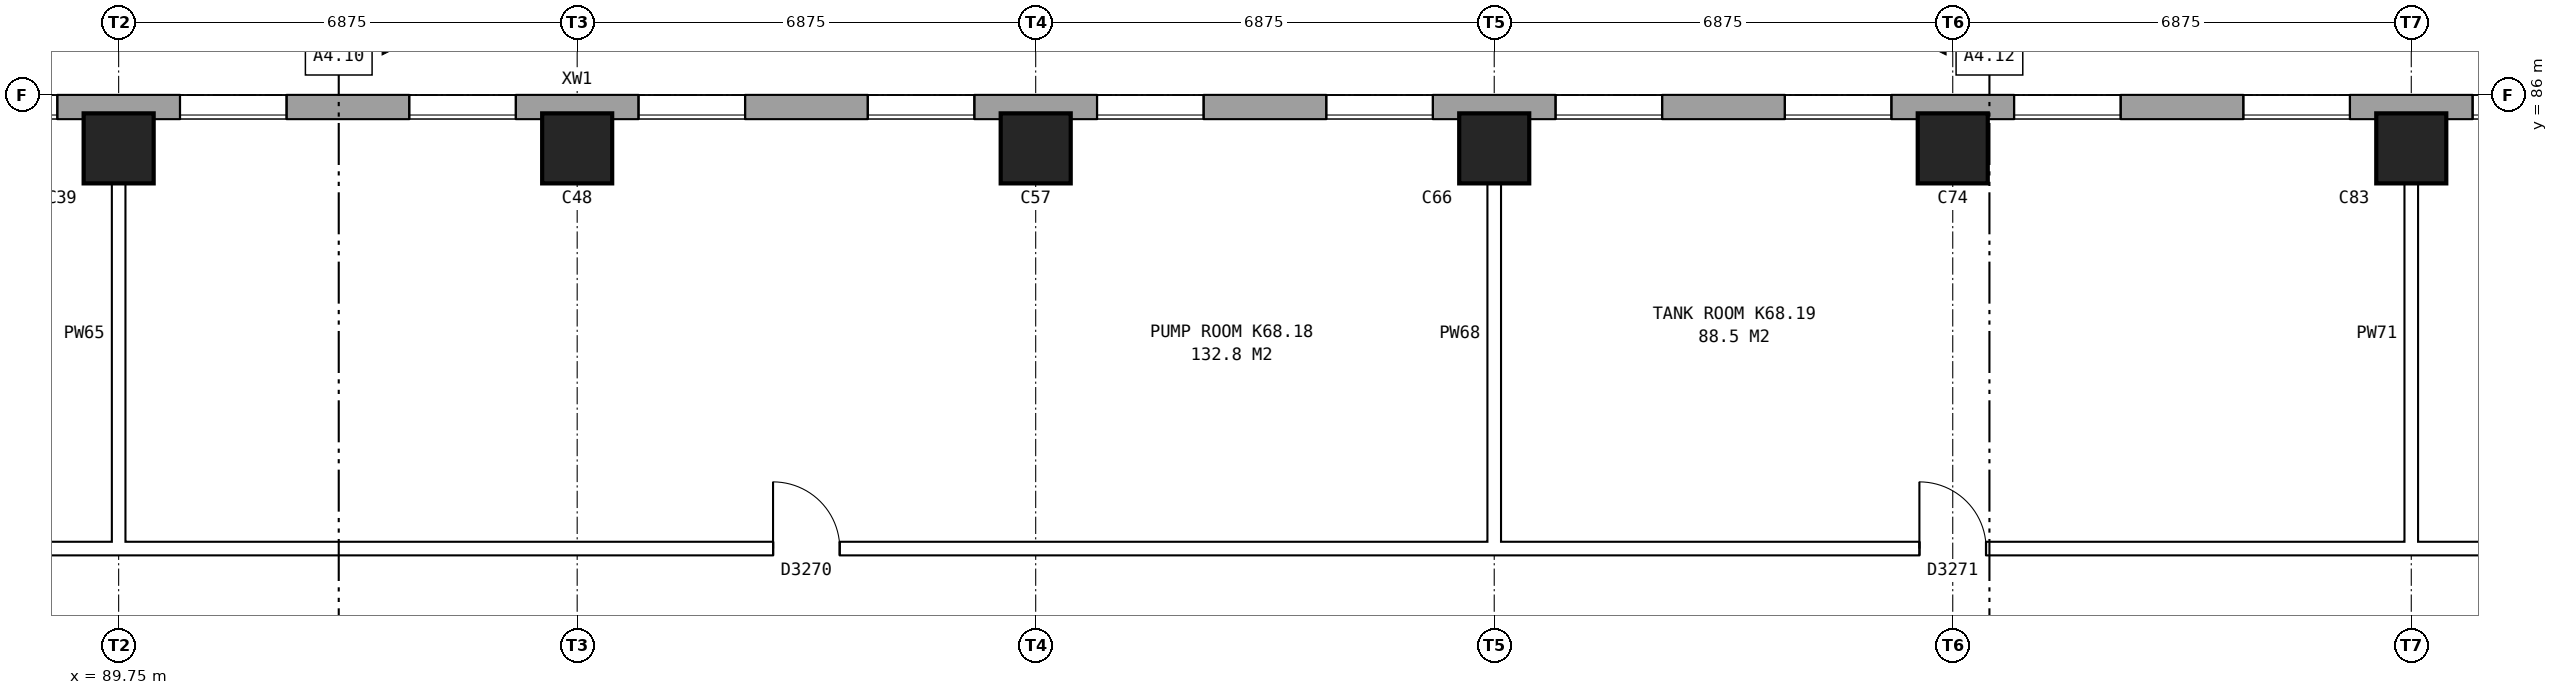
"""IFC4 building model, lengths in metres.
Left out: names, types, materials, properties, quantities, classifications, styles, units other than length and angle.
Written with IfcOpenShell. Run it as: python <this file> out.ifc"""

import sys

from ifc_helpers import new_model, si_unit, direction, frame, frame_2d, origin, origin_2d, place, context, subcontext, project, spatial, rectangle, hollow_rectangle, extrude, element, fill, save


model = new_model("IFC4")
c1 = context("Model", 3, precision=1e-05, world=origin(), true_north=direction((0.0, 1.0)))
c2 = subcontext(c1, "Body", "Model", "MODEL_VIEW")
j1 = project(units=[si_unit("LENGTHUNIT", "METRE"), si_unit("PLANEANGLEUNIT", "RADIAN")], contexts=[c1])
p1 = place(None, origin())
s1 = spatial("IfcSite", under=j1, at=p1, CompositionType="ELEMENT")
p2 = place(p1, origin())
s2 = spatial("IfcBuilding", under=s1, at=p2, CompositionType="ELEMENT")
p3 = place(p2, frame((0.0, 0.0, 243.9)))
s3 = spatial("IfcBuildingStorey", under=s2, at=p3, CompositionType="ELEMENT", Elevation=243.9)
for number, where, z_axis, x_axis in (
    (1, (89.75, 85.2, 0.0), (0.0, 0.0, 1.0), (1.0, 0.0, 0.0)),
    (2, (96.625, 85.2, 0.0), (0.0, 0.0, 1.0), (1.0, 0.0, 0.0)),
    (3, (103.5, 85.2, 0.0), (0.0, 0.0, 1.0), (1.0, 0.0, 0.0)),
    (4, (110.375, 85.2, 0.0), (0.0, 0.0, 1.0), (1.0, 0.0, 0.0)),
    (5, (117.25, 85.2, 0.0), (0.0, 0.0, 1.0), (1.0, 0.0, 0.0)),
    (6, (124.125, 85.2, 0.0), (0.0, 0.0, 1.0), (1.0, 0.0, 0.0)),
):
    element("IfcColumn", number, at=place(p3, frame(where, z_axis=z_axis, x_axis=x_axis)), inside=s3, PredefinedType="COLUMN", context=c2, shape_type="SweptSolid", body=[
        extrude(hollow_rectangle(XDim=1.05, YDim=1.05, WallThickness=0.044, at=origin_2d()), origin(), (0.0, 0.0, 1.0), 18.363),
    ])
p4 = place(p3, frame((131.025, 85.82, 0.0), z_axis=(0.0, 0.0, 1.0), x_axis=(-1.0, 0.0, 0.0)))
e7 = element("IfcWall", 7, at=p4, inside=s3, PredefinedType="STANDARD", context=c2, shape_type="SweptSolid", body=[
    extrude(rectangle(XDim=55.05, YDim=0.36, at=frame_2d((27.525, 0.0))), origin(), (0.0, 0.0, 1.0), 19.21),
])
p5 = place(p4, frame((52.506, 0.0, 1.5)))
e8 = element("IfcOpeningElement", 8, at=p5, cuts=e7, PredefinedType="OPENING", context=c2, shape_type="SweptSolid", body=[
    extrude(rectangle(XDim=1.6, YDim=1.2, at=frame_2d((0.8, 0.6))), frame((0.0, 0.19, 0.0), z_axis=(0.0, -1.0, 0.0), x_axis=(1.0, 0.0, 0.0)), (0.0, 0.0, 1.0), 0.38),
])
p6 = place(p4, frame((49.069, 0.0, 1.5)))
e9 = element("IfcOpeningElement", 9, at=p6, cuts=e7, PredefinedType="OPENING", context=c2, shape_type="SweptSolid", body=[
    extrude(rectangle(XDim=1.6, YDim=1.2, at=frame_2d((0.8, 0.6))), frame((0.0, 0.19, 0.0), z_axis=(0.0, -1.0, 0.0), x_axis=(1.0, 0.0, 0.0)), (0.0, 0.0, 1.0), 0.38),
])
p7 = place(p4, frame((45.631, 0.0, 1.5)))
e10 = element("IfcOpeningElement", 10, at=p7, cuts=e7, PredefinedType="OPENING", context=c2, shape_type="SweptSolid", body=[
    extrude(rectangle(XDim=1.6, YDim=1.2, at=frame_2d((0.8, 0.6))), frame((0.0, 0.19, 0.0), z_axis=(0.0, -1.0, 0.0), x_axis=(1.0, 0.0, 0.0)), (0.0, 0.0, 1.0), 0.38),
])
p8 = place(p4, frame((42.194, 0.0, 1.5)))
e11 = element("IfcOpeningElement", 11, at=p8, cuts=e7, PredefinedType="OPENING", context=c2, shape_type="SweptSolid", body=[
    extrude(rectangle(XDim=1.6, YDim=1.2, at=frame_2d((0.8, 0.6))), frame((0.0, 0.19, 0.0), z_axis=(0.0, -1.0, 0.0), x_axis=(1.0, 0.0, 0.0)), (0.0, 0.0, 1.0), 0.38),
])
p9 = place(p4, frame((38.756, 0.0, 1.5)))
e12 = element("IfcOpeningElement", 12, at=p9, cuts=e7, PredefinedType="OPENING", context=c2, shape_type="SweptSolid", body=[
    extrude(rectangle(XDim=1.6, YDim=1.2, at=frame_2d((0.8, 0.6))), frame((0.0, 0.19, 0.0), z_axis=(0.0, -1.0, 0.0), x_axis=(1.0, 0.0, 0.0)), (0.0, 0.0, 1.0), 0.38),
])
p10 = place(p4, frame((35.319, 0.0, 1.5)))
e13 = element("IfcOpeningElement", 13, at=p10, cuts=e7, PredefinedType="OPENING", context=c2, shape_type="SweptSolid", body=[
    extrude(rectangle(XDim=1.6, YDim=1.2, at=frame_2d((0.8, 0.6))), frame((0.0, 0.19, 0.0), z_axis=(0.0, -1.0, 0.0), x_axis=(1.0, 0.0, 0.0)), (0.0, 0.0, 1.0), 0.38),
])
p11 = place(p4, frame((31.881, 0.0, 1.5)))
e14 = element("IfcOpeningElement", 14, at=p11, cuts=e7, PredefinedType="OPENING", context=c2, shape_type="SweptSolid", body=[
    extrude(rectangle(XDim=1.6, YDim=1.2, at=frame_2d((0.8, 0.6))), frame((0.0, 0.19, 0.0), z_axis=(0.0, -1.0, 0.0), x_axis=(1.0, 0.0, 0.0)), (0.0, 0.0, 1.0), 0.38),
])
p12 = place(p4, frame((28.444, 0.0, 1.5)))
e15 = element("IfcOpeningElement", 15, at=p12, cuts=e7, PredefinedType="OPENING", context=c2, shape_type="SweptSolid", body=[
    extrude(rectangle(XDim=1.6, YDim=1.2, at=frame_2d((0.8, 0.6))), frame((0.0, 0.19, 0.0), z_axis=(0.0, -1.0, 0.0), x_axis=(1.0, 0.0, 0.0)), (0.0, 0.0, 1.0), 0.38),
])
p13 = place(p4, frame((25.006, 0.0, 1.5)))
e16 = element("IfcOpeningElement", 16, at=p13, cuts=e7, PredefinedType="OPENING", context=c2, shape_type="SweptSolid", body=[
    extrude(rectangle(XDim=1.6, YDim=1.2, at=frame_2d((0.8, 0.6))), frame((0.0, 0.19, 0.0), z_axis=(0.0, -1.0, 0.0), x_axis=(1.0, 0.0, 0.0)), (0.0, 0.0, 1.0), 0.38),
])
p14 = place(p4, frame((21.569, 0.0, 1.5)))
e17 = element("IfcOpeningElement", 17, at=p14, cuts=e7, PredefinedType="OPENING", context=c2, shape_type="SweptSolid", body=[
    extrude(rectangle(XDim=1.6, YDim=1.2, at=frame_2d((0.8, 0.6))), frame((0.0, 0.19, 0.0), z_axis=(0.0, -1.0, 0.0), x_axis=(1.0, 0.0, 0.0)), (0.0, 0.0, 1.0), 0.38),
])
p15 = place(p4, frame((18.131, 0.0, 1.5)))
e18 = element("IfcOpeningElement", 18, at=p15, cuts=e7, PredefinedType="OPENING", context=c2, shape_type="SweptSolid", body=[
    extrude(rectangle(XDim=1.6, YDim=1.2, at=frame_2d((0.8, 0.6))), frame((0.0, 0.19, 0.0), z_axis=(0.0, -1.0, 0.0), x_axis=(1.0, 0.0, 0.0)), (0.0, 0.0, 1.0), 0.38),
])
p16 = place(p4, frame((14.694, 0.0, 1.5)))
e19 = element("IfcOpeningElement", 19, at=p16, cuts=e7, PredefinedType="OPENING", context=c2, shape_type="SweptSolid", body=[
    extrude(rectangle(XDim=1.6, YDim=1.2, at=frame_2d((0.8, 0.6))), frame((0.0, 0.19, 0.0), z_axis=(0.0, -1.0, 0.0), x_axis=(1.0, 0.0, 0.0)), (0.0, 0.0, 1.0), 0.38),
])
p17 = place(p4, frame((11.256, 0.0, 1.5)))
e20 = element("IfcOpeningElement", 20, at=p17, cuts=e7, PredefinedType="OPENING", context=c2, shape_type="SweptSolid", body=[
    extrude(rectangle(XDim=1.6, YDim=1.2, at=frame_2d((0.8, 0.6))), frame((0.0, 0.19, 0.0), z_axis=(0.0, -1.0, 0.0), x_axis=(1.0, 0.0, 0.0)), (0.0, 0.0, 1.0), 0.38),
])
p18 = place(p4, frame((7.819, 0.0, 1.5)))
e21 = element("IfcOpeningElement", 21, at=p18, cuts=e7, PredefinedType="OPENING", context=c2, shape_type="SweptSolid", body=[
    extrude(rectangle(XDim=1.6, YDim=1.2, at=frame_2d((0.8, 0.6))), frame((0.0, 0.19, 0.0), z_axis=(0.0, -1.0, 0.0), x_axis=(1.0, 0.0, 0.0)), (0.0, 0.0, 1.0), 0.38),
])
p19 = place(p4, frame((4.381, 0.0, 1.5)))
e22 = element("IfcOpeningElement", 22, at=p19, cuts=e7, PredefinedType="OPENING", context=c2, shape_type="SweptSolid", body=[
    extrude(rectangle(XDim=1.6, YDim=1.2, at=frame_2d((0.8, 0.6))), frame((0.0, 0.19, 0.0), z_axis=(0.0, -1.0, 0.0), x_axis=(1.0, 0.0, 0.0)), (0.0, 0.0, 1.0), 0.38),
])
p20 = place(p4, frame((0.944, 0.0, 1.5)))
e23 = element("IfcOpeningElement", 23, at=p20, cuts=e7, PredefinedType="OPENING", context=c2, shape_type="SweptSolid", body=[
    extrude(rectangle(XDim=1.6, YDim=1.2, at=frame_2d((0.8, 0.6))), frame((0.0, 0.19, 0.0), z_axis=(0.0, -1.0, 0.0), x_axis=(1.0, 0.0, 0.0)), (0.0, 0.0, 1.0), 0.38),
])
p21 = place(p3, frame((32.24, 79.2, 0.0), z_axis=(0.0, 0.0, 1.0), x_axis=(1.0, 0.0, 0.0)))
e24 = element("IfcWall", 24, at=p21, inside=s3, PredefinedType="PARTITIONING", context=c2, shape_type="SweptSolid", body=[
    extrude(rectangle(XDim=136.52, YDim=0.2, at=frame_2d((68.26, 0.0))), origin(), (0.0, 0.0, 1.0), 3.3),
])
p22 = place(p21, frame((3.44, 0.0, 0.0)))
e25 = element("IfcOpeningElement", 25, at=p22, cuts=e24, PredefinedType="OPENING", context=c2, shape_type="SweptSolid", body=[
    extrude(rectangle(XDim=1.0, YDim=2.1, at=frame_2d((0.5, 1.05))), frame((0.0, 0.11, 0.0), z_axis=(0.0, -1.0, 0.0), x_axis=(1.0, 0.0, 0.0)), (0.0, 0.0, 1.0), 0.22),
])
p23 = place(p21, frame((13.26, 0.0, 0.0)))
e26 = element("IfcOpeningElement", 26, at=p23, cuts=e24, PredefinedType="OPENING", context=c2, shape_type="SweptSolid", body=[
    extrude(rectangle(XDim=1.0, YDim=2.1, at=frame_2d((0.5, 1.05))), frame((0.0, 0.11, 0.0), z_axis=(0.0, -1.0, 0.0), x_axis=(1.0, 0.0, 0.0)), (0.0, 0.0, 1.0), 0.22),
])
p24 = place(p21, frame((25.26, 0.0, 0.0)))
e27 = element("IfcOpeningElement", 27, at=p24, cuts=e24, PredefinedType="OPENING", context=c2, shape_type="SweptSolid", body=[
    extrude(rectangle(XDim=1.0, YDim=2.1, at=frame_2d((0.5, 1.05))), frame((0.0, 0.11, 0.0), z_axis=(0.0, -1.0, 0.0), x_axis=(1.0, 0.0, 0.0)), (0.0, 0.0, 1.0), 0.22),
])
p25 = place(p21, frame((37.08, 0.0, 0.0)))
e28 = element("IfcOpeningElement", 28, at=p25, cuts=e24, PredefinedType="OPENING", context=c2, shape_type="SweptSolid", body=[
    extrude(rectangle(XDim=1.0, YDim=2.1, at=frame_2d((0.5, 1.05))), frame((0.0, 0.11, 0.0), z_axis=(0.0, -1.0, 0.0), x_axis=(1.0, 0.0, 0.0)), (0.0, 0.0, 1.0), 0.22),
])
p26 = place(p21, frame((49.955, 0.0, 0.0)))
e29 = element("IfcOpeningElement", 29, at=p26, cuts=e24, PredefinedType="OPENING", context=c2, shape_type="SweptSolid", body=[
    extrude(rectangle(XDim=1.0, YDim=2.1, at=frame_2d((0.5, 1.05))), frame((0.0, 0.11, 0.0), z_axis=(0.0, -1.0, 0.0), x_axis=(1.0, 0.0, 0.0)), (0.0, 0.0, 1.0), 0.22),
])
p27 = place(p21, frame((67.322, 0.0, 0.0)))
e30 = element("IfcOpeningElement", 30, at=p27, cuts=e24, PredefinedType="OPENING", context=c2, shape_type="SweptSolid", body=[
    extrude(rectangle(XDim=1.0, YDim=2.1, at=frame_2d((0.5, 1.05))), frame((0.0, 0.11, 0.0), z_axis=(0.0, -1.0, 0.0), x_axis=(1.0, 0.0, 0.0)), (0.0, 0.0, 1.0), 0.22),
])
p28 = place(p21, frame((84.51, 0.0, 0.0)))
e31 = element("IfcOpeningElement", 31, at=p28, cuts=e24, PredefinedType="OPENING", context=c2, shape_type="SweptSolid", body=[
    extrude(rectangle(XDim=1.0, YDim=2.1, at=frame_2d((0.5, 1.05))), frame((0.0, 0.11, 0.0), z_axis=(0.0, -1.0, 0.0), x_axis=(1.0, 0.0, 0.0)), (0.0, 0.0, 1.0), 0.22),
])
p29 = place(p21, frame((95.003, 0.0, 0.0)))
e32 = element("IfcOpeningElement", 32, at=p29, cuts=e24, PredefinedType="OPENING", context=c2, shape_type="SweptSolid", body=[
    extrude(rectangle(XDim=1.0, YDim=2.1, at=frame_2d((0.5, 1.05))), frame((0.0, 0.11, 0.0), z_axis=(0.0, -1.0, 0.0), x_axis=(1.0, 0.0, 0.0)), (0.0, 0.0, 1.0), 0.22),
])
p30 = place(p21, frame((104.44, 0.0, 0.0)))
e33 = element("IfcOpeningElement", 33, at=p30, cuts=e24, PredefinedType="OPENING", context=c2, shape_type="SweptSolid", body=[
    extrude(rectangle(XDim=1.0, YDim=2.1, at=frame_2d((0.5, 1.05))), frame((0.0, 0.11, 0.0), z_axis=(0.0, -1.0, 0.0), x_axis=(1.0, 0.0, 0.0)), (0.0, 0.0, 1.0), 0.22),
])
p31 = place(p21, frame((123.48, 0.0, 0.0)))
e34 = element("IfcOpeningElement", 34, at=p31, cuts=e24, PredefinedType="OPENING", context=c2, shape_type="SweptSolid", body=[
    extrude(rectangle(XDim=1.0, YDim=2.1, at=frame_2d((0.5, 1.05))), frame((0.0, 0.11, 0.0), z_axis=(0.0, -1.0, 0.0), x_axis=(1.0, 0.0, 0.0)), (0.0, 0.0, 1.0), 0.22),
])
for number, where, z_axis, x_axis in (
    (35, (89.75, 79.1, 0.0), (0.0, 0.0, 1.0), (0.0, 1.0, 0.0)),
    (36, (110.375, 79.1, 0.0), (0.0, 0.0, 1.0), (0.0, 1.0, 0.0)),
    (37, (124.125, 79.1, 0.0), (0.0, 0.0, 1.0), (0.0, 1.0, 0.0)),
):
    element("IfcWall", number, at=place(p3, frame(where, z_axis=z_axis, x_axis=x_axis)), inside=s3, PredefinedType="PARTITIONING", context=c2, shape_type="SweptSolid", body=[
        extrude(rectangle(XDim=6.66, YDim=0.2, at=frame_2d((3.33, 0.0))), origin(), (0.0, 0.0, 1.0), 3.3),
    ])
p32 = place(p8, origin())
e38 = element("IfcWindow", 38, at=p32, inside=s3, PartitioningType="DOUBLE_PANEL_HORIZONTAL", PredefinedType="WINDOW", context=c2, shape_type="SweptSolid", body=[
    extrude(rectangle(XDim=1.6, YDim=1.2, at=frame_2d((0.8, 0.6))), frame((0.0, 0.15, 0.0), z_axis=(0.0, -1.0, 0.0), x_axis=(1.0, 0.0, 0.0)), (0.0, 0.0, 1.0), 0.06),
])
fill(e11, e38)
p33 = place(p9, origin())
e39 = element("IfcWindow", 39, at=p33, inside=s3, PartitioningType="DOUBLE_PANEL_HORIZONTAL", PredefinedType="WINDOW", context=c2, shape_type="SweptSolid", body=[
    extrude(rectangle(XDim=1.6, YDim=1.2, at=frame_2d((0.8, 0.6))), frame((0.0, 0.15, 0.0), z_axis=(0.0, -1.0, 0.0), x_axis=(1.0, 0.0, 0.0)), (0.0, 0.0, 1.0), 0.06),
])
fill(e12, e39)
p34 = place(p10, origin())
e40 = element("IfcWindow", 40, at=p34, inside=s3, PartitioningType="DOUBLE_PANEL_HORIZONTAL", PredefinedType="WINDOW", context=c2, shape_type="SweptSolid", body=[
    extrude(rectangle(XDim=1.6, YDim=1.2, at=frame_2d((0.8, 0.6))), frame((0.0, 0.15, 0.0), z_axis=(0.0, -1.0, 0.0), x_axis=(1.0, 0.0, 0.0)), (0.0, 0.0, 1.0), 0.06),
])
fill(e13, e40)
p35 = place(p11, origin())
e41 = element("IfcWindow", 41, at=p35, inside=s3, PartitioningType="DOUBLE_PANEL_HORIZONTAL", PredefinedType="WINDOW", context=c2, shape_type="SweptSolid", body=[
    extrude(rectangle(XDim=1.6, YDim=1.2, at=frame_2d((0.8, 0.6))), frame((0.0, 0.15, 0.0), z_axis=(0.0, -1.0, 0.0), x_axis=(1.0, 0.0, 0.0)), (0.0, 0.0, 1.0), 0.06),
])
fill(e14, e41)
p36 = place(p12, origin())
e42 = element("IfcWindow", 42, at=p36, inside=s3, PartitioningType="DOUBLE_PANEL_HORIZONTAL", PredefinedType="WINDOW", context=c2, shape_type="SweptSolid", body=[
    extrude(rectangle(XDim=1.6, YDim=1.2, at=frame_2d((0.8, 0.6))), frame((0.0, 0.15, 0.0), z_axis=(0.0, -1.0, 0.0), x_axis=(1.0, 0.0, 0.0)), (0.0, 0.0, 1.0), 0.06),
])
fill(e15, e42)
p37 = place(p13, origin())
e43 = element("IfcWindow", 43, at=p37, inside=s3, PartitioningType="DOUBLE_PANEL_HORIZONTAL", PredefinedType="WINDOW", context=c2, shape_type="SweptSolid", body=[
    extrude(rectangle(XDim=1.6, YDim=1.2, at=frame_2d((0.8, 0.6))), frame((0.0, 0.15, 0.0), z_axis=(0.0, -1.0, 0.0), x_axis=(1.0, 0.0, 0.0)), (0.0, 0.0, 1.0), 0.06),
])
fill(e16, e43)
p38 = place(p14, origin())
e44 = element("IfcWindow", 44, at=p38, inside=s3, PartitioningType="DOUBLE_PANEL_HORIZONTAL", PredefinedType="WINDOW", context=c2, shape_type="SweptSolid", body=[
    extrude(rectangle(XDim=1.6, YDim=1.2, at=frame_2d((0.8, 0.6))), frame((0.0, 0.15, 0.0), z_axis=(0.0, -1.0, 0.0), x_axis=(1.0, 0.0, 0.0)), (0.0, 0.0, 1.0), 0.06),
])
fill(e17, e44)
p39 = place(p15, origin())
e45 = element("IfcWindow", 45, at=p39, inside=s3, PartitioningType="DOUBLE_PANEL_HORIZONTAL", PredefinedType="WINDOW", context=c2, shape_type="SweptSolid", body=[
    extrude(rectangle(XDim=1.6, YDim=1.2, at=frame_2d((0.8, 0.6))), frame((0.0, 0.15, 0.0), z_axis=(0.0, -1.0, 0.0), x_axis=(1.0, 0.0, 0.0)), (0.0, 0.0, 1.0), 0.06),
])
fill(e18, e45)
p40 = place(p16, origin())
e46 = element("IfcWindow", 46, at=p40, inside=s3, PartitioningType="DOUBLE_PANEL_HORIZONTAL", PredefinedType="WINDOW", context=c2, shape_type="SweptSolid", body=[
    extrude(rectangle(XDim=1.6, YDim=1.2, at=frame_2d((0.8, 0.6))), frame((0.0, 0.15, 0.0), z_axis=(0.0, -1.0, 0.0), x_axis=(1.0, 0.0, 0.0)), (0.0, 0.0, 1.0), 0.06),
])
fill(e19, e46)
p41 = place(p17, origin())
e47 = element("IfcWindow", 47, at=p41, inside=s3, PartitioningType="DOUBLE_PANEL_HORIZONTAL", PredefinedType="WINDOW", context=c2, shape_type="SweptSolid", body=[
    extrude(rectangle(XDim=1.6, YDim=1.2, at=frame_2d((0.8, 0.6))), frame((0.0, 0.15, 0.0), z_axis=(0.0, -1.0, 0.0), x_axis=(1.0, 0.0, 0.0)), (0.0, 0.0, 1.0), 0.06),
])
fill(e20, e47)
p42 = place(p18, origin())
e48 = element("IfcWindow", 48, at=p42, inside=s3, PartitioningType="DOUBLE_PANEL_HORIZONTAL", PredefinedType="WINDOW", context=c2, shape_type="SweptSolid", body=[
    extrude(rectangle(XDim=1.6, YDim=1.2, at=frame_2d((0.8, 0.6))), frame((0.0, 0.15, 0.0), z_axis=(0.0, -1.0, 0.0), x_axis=(1.0, 0.0, 0.0)), (0.0, 0.0, 1.0), 0.06),
])
fill(e21, e48)
p43 = place(p19, origin())
e49 = element("IfcWindow", 49, at=p43, inside=s3, PartitioningType="DOUBLE_PANEL_HORIZONTAL", PredefinedType="WINDOW", context=c2, shape_type="SweptSolid", body=[
    extrude(rectangle(XDim=1.6, YDim=1.2, at=frame_2d((0.8, 0.6))), frame((0.0, 0.15, 0.0), z_axis=(0.0, -1.0, 0.0), x_axis=(1.0, 0.0, 0.0)), (0.0, 0.0, 1.0), 0.06),
])
fill(e22, e49)
p44 = place(p27, origin())
e50 = element("IfcDoor", 50, at=p44, inside=s3, OperationType="SINGLE_SWING_LEFT", PredefinedType="DOOR", context=c2, shape_type="SweptSolid", body=[
    extrude(rectangle(XDim=1.0, YDim=2.1, at=frame_2d((0.5, 1.05))), frame((0.0, 0.025, 0.0), z_axis=(0.0, -1.0, 0.0), x_axis=(1.0, 0.0, 0.0)), (0.0, 0.0, 1.0), 0.05),
])
fill(e30, e50)
p45 = place(p28, origin())
e51 = element("IfcDoor", 51, at=p45, inside=s3, OperationType="SINGLE_SWING_LEFT", PredefinedType="DOOR", context=c2, shape_type="SweptSolid", body=[
    extrude(rectangle(XDim=1.0, YDim=2.1, at=frame_2d((0.5, 1.05))), frame((0.0, 0.025, 0.0), z_axis=(0.0, -1.0, 0.0), x_axis=(1.0, 0.0, 0.0)), (0.0, 0.0, 1.0), 0.05),
])
fill(e31, e51)
save(model, sys.argv[1])
